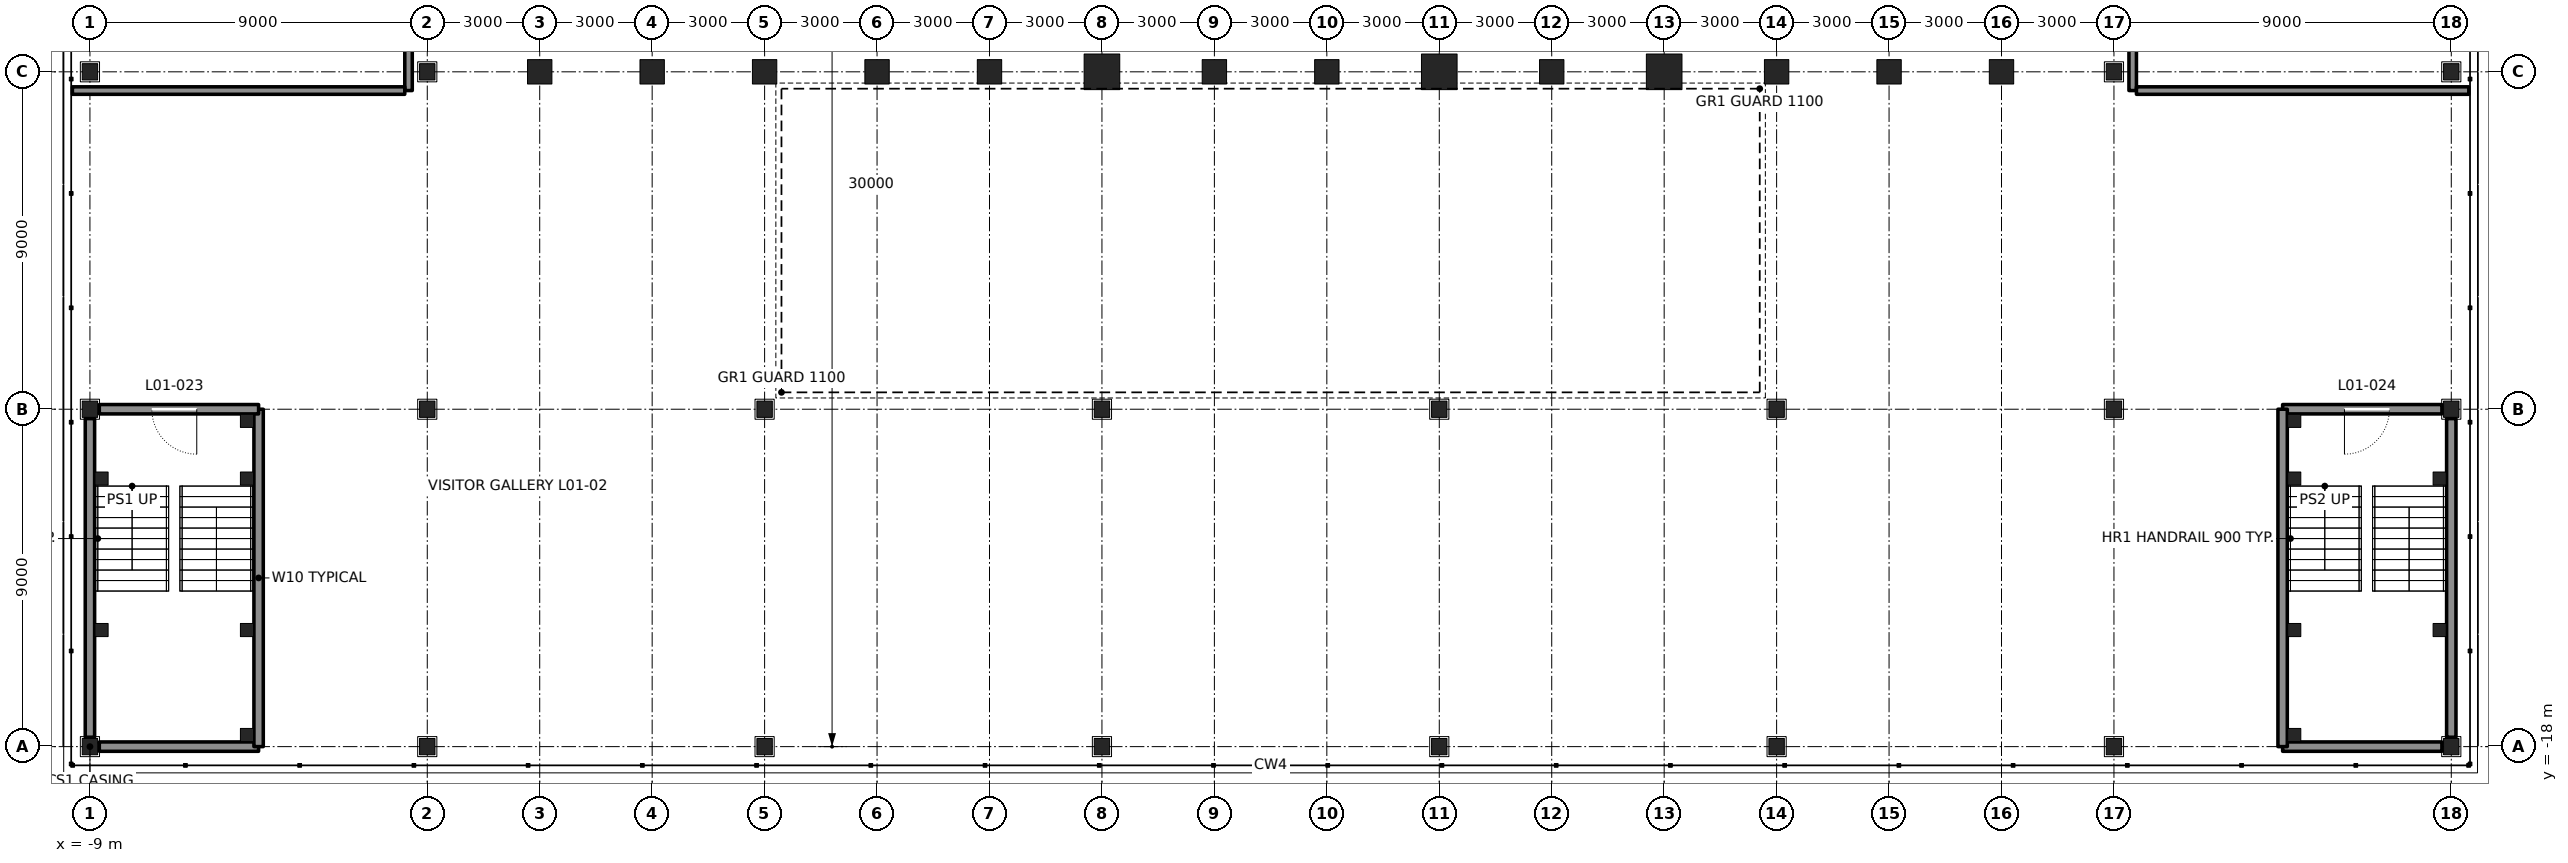
"""IFC4 building model, lengths in metres.
Left out: names, types, materials, properties, quantities, classifications, styles, units other than length and angle.
Written with IfcOpenShell. Run it as: python <this file> out.ifc"""

import sys

from ifc_helpers import new_model, si_unit, direction, frame, frame_2d, origin, origin_2d, place, context, subcontext, project, spatial, rectangle, hollow_rectangle, i_section, extrude, element, fill, save


model = new_model("IFC4")
c1 = context("Model", 3, precision=1e-05, world=origin(), true_north=direction((0.0, 1.0)))
c2 = subcontext(c1, "Body", "Model", "MODEL_VIEW")
j1 = project(units=[si_unit("LENGTHUNIT", "METRE"), si_unit("PLANEANGLEUNIT", "RADIAN")], contexts=[c1])
p1 = place(None, origin())
s1 = spatial("IfcSite", under=j1, at=p1, CompositionType="ELEMENT")
p2 = place(p1, origin())
s2 = spatial("IfcBuilding", under=s1, at=p2, CompositionType="ELEMENT")
p3 = place(p2, frame((0.0, 0.0, 6.0)))
s3 = spatial("IfcBuildingStorey", under=s2, at=p3, CompositionType="ELEMENT", Elevation=6.0)
for number, where, z_axis, x_axis in (
    (1, (3.0, 0.0, 0.0), (0.0, 0.0, 1.0), (0.0, -1.0, 0.0)),
    (2, (6.0, 0.0, 0.0), (0.0, 0.0, 1.0), (0.0, -1.0, 0.0)),
    (3, (9.0, 0.0, 0.0), (0.0, 0.0, 1.0), (0.0, -1.0, 0.0)),
    (4, (12.0, 0.0, 0.0), (0.0, 0.0, 1.0), (0.0, -1.0, 0.0)),
    (5, (15.0, 0.0, 0.0), (0.0, 0.0, 1.0), (0.0, -1.0, 0.0)),
):
    element("IfcColumn", number, at=place(p3, frame(where, z_axis=z_axis, x_axis=x_axis)), inside=s3, PredefinedType="COLUMN", context=c2, shape_type="SweptSolid", body=[
        extrude(hollow_rectangle(XDim=0.65, YDim=0.65, WallThickness=0.065, at=origin_2d()), origin(), (0.0, 0.0, 1.0), 7.5),
    ])
p4 = place(p3, frame((18.0, 0.0, 0.0), z_axis=(0.0, 0.0, 1.0), x_axis=(0.0, -1.0, 0.0)))
e6 = element("IfcColumn", 6, at=p4, inside=s3, PredefinedType="COLUMN", context=c2, shape_type="SweptSolid", body=[
    extrude(hollow_rectangle(XDim=0.95, YDim=0.95, WallThickness=0.11, at=origin_2d()), origin(), (0.0, 0.0, 1.0), 7.5),
])
for number, where, z_axis, x_axis in (
    (7, (21.0, 0.0, 0.0), (0.0, 0.0, 1.0), (0.0, -1.0, 0.0)),
    (8, (24.0, 0.0, 0.0), (0.0, 0.0, 1.0), (0.0, -1.0, 0.0)),
):
    element("IfcColumn", number, at=place(p3, frame(where, z_axis=z_axis, x_axis=x_axis)), inside=s3, PredefinedType="COLUMN", context=c2, shape_type="SweptSolid", body=[
        extrude(hollow_rectangle(XDim=0.65, YDim=0.65, WallThickness=0.065, at=origin_2d()), origin(), (0.0, 0.0, 1.0), 7.5),
    ])
p5 = place(p3, frame((27.0, 0.0, 0.0), z_axis=(0.0, 0.0, 1.0), x_axis=(0.0, -1.0, 0.0)))
e9 = element("IfcColumn", 9, at=p5, inside=s3, PredefinedType="COLUMN", context=c2, shape_type="SweptSolid", body=[
    extrude(hollow_rectangle(XDim=0.95, YDim=0.95, WallThickness=0.11, at=origin_2d()), origin(), (0.0, 0.0, 1.0), 7.5),
])
p6 = place(p3, frame((30.0, 0.0, 0.0), z_axis=(0.0, 0.0, 1.0), x_axis=(0.0, -1.0, 0.0)))
e10 = element("IfcColumn", 10, at=p6, inside=s3, PredefinedType="COLUMN", context=c2, shape_type="SweptSolid", body=[
    extrude(hollow_rectangle(XDim=0.65, YDim=0.65, WallThickness=0.065, at=origin_2d()), origin(), (0.0, 0.0, 1.0), 7.5),
])
p7 = place(p3, frame((33.0, 0.0, 0.0), z_axis=(0.0, 0.0, 1.0), x_axis=(0.0, -1.0, 0.0)))
e11 = element("IfcColumn", 11, at=p7, inside=s3, PredefinedType="COLUMN", context=c2, shape_type="SweptSolid", body=[
    extrude(hollow_rectangle(XDim=0.95, YDim=0.95, WallThickness=0.11, at=origin_2d()), origin(), (0.0, 0.0, 1.0), 7.5),
])
for number, where, z_axis, x_axis in (
    (12, (36.0, 0.0, 0.0), (0.0, 0.0, 1.0), (0.0, -1.0, 0.0)),
    (13, (39.0, 0.0, 0.0), (0.0, 0.0, 1.0), (0.0, -1.0, 0.0)),
    (14, (42.0, 0.0, 0.0), (0.0, 0.0, 1.0), (0.0, -1.0, 0.0)),
):
    element("IfcColumn", number, at=place(p3, frame(where, z_axis=z_axis, x_axis=x_axis)), inside=s3, PredefinedType="COLUMN", context=c2, shape_type="SweptSolid", body=[
        extrude(hollow_rectangle(XDim=0.65, YDim=0.65, WallThickness=0.065, at=origin_2d()), origin(), (0.0, 0.0, 1.0), 7.5),
    ])
for number, where, z_axis, x_axis in (
    (15, (-9.0, -18.0, 0.0), (0.0, 0.0, 1.0), (1.0, 0.0, 0.0)),
    (16, (-9.0, -9.0, 0.0), (0.0, 0.0, 1.0), (1.0, 0.0, 0.0)),
    (17, (-9.0, 0.0, 0.0), (0.0, 0.0, 1.0), (1.0, 0.0, 0.0)),
    (18, (0.0, -18.0, 0.0), (0.0, 0.0, 1.0), (1.0, 0.0, 0.0)),
    (19, (0.0, -9.0, 0.0), (0.0, 0.0, 1.0), (1.0, 0.0, 0.0)),
    (20, (0.0, 0.0, 0.0), (0.0, 0.0, 1.0), (1.0, 0.0, 0.0)),
    (21, (9.0, -18.0, 0.0), (0.0, 0.0, 1.0), (1.0, 0.0, 0.0)),
    (22, (9.0, -9.0, 0.0), (0.0, 0.0, 1.0), (1.0, 0.0, 0.0)),
    (23, (18.0, -18.0, 0.0), (0.0, 0.0, 1.0), (1.0, 0.0, 0.0)),
    (24, (18.0, -9.0, 0.0), (0.0, 0.0, 1.0), (1.0, 0.0, 0.0)),
    (25, (27.0, -18.0, 0.0), (0.0, 0.0, 1.0), (1.0, 0.0, 0.0)),
    (26, (27.0, -9.0, 0.0), (0.0, 0.0, 1.0), (1.0, 0.0, 0.0)),
    (27, (36.0, -18.0, 0.0), (0.0, 0.0, 1.0), (1.0, 0.0, 0.0)),
    (28, (36.0, -9.0, 0.0), (0.0, 0.0, 1.0), (1.0, 0.0, 0.0)),
    (29, (45.0, -18.0, 0.0), (0.0, 0.0, 1.0), (1.0, 0.0, 0.0)),
    (30, (45.0, -9.0, 0.0), (0.0, 0.0, 1.0), (1.0, 0.0, 0.0)),
    (31, (45.0, 0.0, 0.0), (0.0, 0.0, 1.0), (1.0, 0.0, 0.0)),
    (32, (54.0, -18.0, 0.0), (0.0, 0.0, 1.0), (1.0, 0.0, 0.0)),
    (33, (54.0, -9.0, 0.0), (0.0, 0.0, 1.0), (1.0, 0.0, 0.0)),
    (34, (54.0, 0.0, 0.0), (0.0, 0.0, 1.0), (1.0, 0.0, 0.0)),
):
    element("IfcColumn", number, at=place(p3, frame(where, z_axis=z_axis, x_axis=x_axis)), inside=s3, PredefinedType="COLUMN", context=c2, shape_type="SweptSolid", body=[
        extrude(i_section(OverallWidth=0.411, OverallDepth=0.434, WebThickness=0.036, FlangeThickness=0.057, at=origin_2d()), origin(), (0.0, 0.0, 1.0), 7.5),
    ])
p8 = place(p3, frame((-0.5, -0.5, 0.0), z_axis=(0.0, 0.0, 1.0), x_axis=(0.0, 1.0, 0.0)))
e35 = element("IfcWall", 35, at=p8, inside=s3, PredefinedType="PARTITIONING", context=c2, shape_type="SweptSolid", body=[
    extrude(rectangle(XDim=46.018, YDim=0.2, at=frame_2d((23.009, 0.0))), origin(), (0.0, 0.0, 1.0), 7.3),
])
p9 = place(p8, frame((13.1, 0.0, 0.0)))
e36 = element("IfcOpeningElement", 36, at=p9, cuts=e35, PredefinedType="OPENING", context=c2, shape_type="SweptSolid", body=[
    extrude(rectangle(XDim=1.8, YDim=2.4, at=frame_2d((0.9, 1.2))), frame((0.0, 0.11, 0.0), z_axis=(0.0, -1.0, 0.0), x_axis=(1.0, 0.0, 0.0)), (0.0, 0.0, 1.0), 0.22),
])
p10 = place(p3, frame((45.5, -0.5, 0.0), z_axis=(0.0, 0.0, 1.0), x_axis=(0.0, 1.0, 0.0)))
e37 = element("IfcWall", 37, at=p10, inside=s3, PredefinedType="PARTITIONING", context=c2, shape_type="SweptSolid", body=[
    extrude(rectangle(XDim=46.018, YDim=0.2, at=frame_2d((23.009, 0.0))), origin(), (0.0, 0.0, 1.0), 7.3),
])
p11 = place(p10, frame((10.1, 0.0, 0.0)))
e38 = element("IfcOpeningElement", 38, at=p11, cuts=e37, PredefinedType="OPENING", context=c2, shape_type="SweptSolid", body=[
    extrude(rectangle(XDim=1.8, YDim=2.4, at=frame_2d((0.9, 1.2))), frame((0.0, 0.11, 0.0), z_axis=(0.0, -1.0, 0.0), x_axis=(1.0, 0.0, 0.0)), (0.0, 0.0, 1.0), 0.22),
])
for number, where, z_axis, x_axis in (
    (39, (-9.468, -0.5, 0.0), (0.0, 0.0, 1.0), (1.0, 0.0, 0.0)),
    (40, (45.6, -0.5, 0.0), (0.0, 0.0, 1.0), (1.0, 0.0, 0.0)),
):
    element("IfcWall", number, at=place(p3, frame(where, z_axis=z_axis, x_axis=x_axis)), inside=s3, PredefinedType="PARTITIONING", context=c2, shape_type="SweptSolid", body=[
        extrude(rectangle(XDim=8.868, YDim=0.2, at=frame_2d((4.434, 0.0))), origin(), (0.0, 0.0, 1.0), 7.3),
    ])
p12 = place(p3, frame((-8.75, -18.0, 0.0), z_axis=(0.0, 0.0, 1.0), x_axis=(1.0, 0.0, 0.0)))
e41 = element("IfcWall", 41, at=p12, inside=s3, PredefinedType="SOLIDWALL", context=c2, shape_type="SweptSolid", body=[
    extrude(rectangle(XDim=4.25, YDim=0.25, at=frame_2d((2.125, 0.0))), origin(), (0.0, 0.0, 1.0), 6.353),
])
p13 = place(p3, frame((-4.5, -18.0, 0.0), z_axis=(0.0, 0.0, 1.0), x_axis=(0.0, 1.0, 0.0)))
e42 = element("IfcWall", 42, at=p13, inside=s3, PredefinedType="SOLIDWALL", context=c2, shape_type="SweptSolid", body=[
    extrude(rectangle(XDim=9.0, YDim=0.25, at=frame_2d((4.5, 0.0))), origin(), (0.0, 0.0, 1.0), 6.698),
])
p14 = place(p3, frame((-8.75, -9.0, 0.0), z_axis=(0.0, 0.0, 1.0), x_axis=(1.0, 0.0, 0.0)))
e43 = element("IfcWall", 43, at=p14, inside=s3, PredefinedType="SOLIDWALL", context=c2, shape_type="SweptSolid", body=[
    extrude(rectangle(XDim=4.25, YDim=0.25, at=frame_2d((2.125, 0.0))), origin(), (0.0, 0.0, 1.0), 6.353),
])
p15 = place(p14, frame((1.4, 0.0, 0.0)))
e44 = element("IfcOpeningElement", 44, at=p15, cuts=e43, PredefinedType="OPENING", context=c2, shape_type="SweptSolid", body=[
    extrude(rectangle(XDim=1.2, YDim=2.1, at=frame_2d((0.6, 1.05))), frame((0.0, 0.135, 0.0), z_axis=(0.0, -1.0, 0.0), x_axis=(1.0, 0.0, 0.0)), (0.0, 0.0, 1.0), 0.27),
])
p16 = place(p3, frame((-9.0, -17.75, 0.0), z_axis=(0.0, 0.0, 1.0), x_axis=(0.0, 1.0, 0.0)))
e45 = element("IfcWall", 45, at=p16, inside=s3, PredefinedType="SOLIDWALL", context=c2, shape_type="SweptSolid", body=[
    extrude(rectangle(XDim=8.5, YDim=0.25, at=frame_2d((4.25, 0.0))), origin(), (0.0, 0.0, 1.0), 6.353),
])
p17 = place(p3, frame((49.5, -18.0, 0.0), z_axis=(0.0, 0.0, 1.0), x_axis=(1.0, 0.0, 0.0)))
e46 = element("IfcWall", 46, at=p17, inside=s3, PredefinedType="SOLIDWALL", context=c2, shape_type="SweptSolid", body=[
    extrude(rectangle(XDim=4.25, YDim=0.25, at=frame_2d((2.125, 0.0))), origin(), (0.0, 0.0, 1.0), 6.353),
])
p18 = place(p3, frame((54.0, -17.75, 0.0), z_axis=(0.0, 0.0, 1.0), x_axis=(0.0, 1.0, 0.0)))
e47 = element("IfcWall", 47, at=p18, inside=s3, PredefinedType="SOLIDWALL", context=c2, shape_type="SweptSolid", body=[
    extrude(rectangle(XDim=8.5, YDim=0.25, at=frame_2d((4.25, 0.0))), origin(), (0.0, 0.0, 1.0), 6.353),
])
p19 = place(p3, frame((49.5, -9.0, 0.0), z_axis=(0.0, 0.0, 1.0), x_axis=(1.0, 0.0, 0.0)))
e48 = element("IfcWall", 48, at=p19, inside=s3, PredefinedType="SOLIDWALL", context=c2, shape_type="SweptSolid", body=[
    extrude(rectangle(XDim=4.25, YDim=0.25, at=frame_2d((2.125, 0.0))), origin(), (0.0, 0.0, 1.0), 6.353),
])
p20 = place(p19, frame((1.65, 0.0, 0.0)))
e49 = element("IfcOpeningElement", 49, at=p20, cuts=e48, PredefinedType="OPENING", context=c2, shape_type="SweptSolid", body=[
    extrude(rectangle(XDim=1.2, YDim=2.1, at=frame_2d((0.6, 1.05))), frame((0.0, 0.135, 0.0), z_axis=(0.0, -1.0, 0.0), x_axis=(1.0, 0.0, 0.0)), (0.0, 0.0, 1.0), 0.27),
])
p21 = place(p3, frame((49.5, -18.0, 0.0), z_axis=(0.0, 0.0, 1.0), x_axis=(0.0, 1.0, 0.0)))
e50 = element("IfcWall", 50, at=p21, inside=s3, PredefinedType="SOLIDWALL", context=c2, shape_type="SweptSolid", body=[
    extrude(rectangle(XDim=9.0, YDim=0.25, at=frame_2d((4.5, 0.0))), origin(), (0.0, 0.0, 1.0), 6.698),
])
for number, where, z_axis, x_axis in (
    (51, (-4.81, -17.69, 0.0), (0.0, 0.0, 1.0), (1.0, 0.0, 0.0)),
    (52, (-8.69, -14.89, 0.0), (0.0, 0.0, 1.0), (1.0, 0.0, 0.0)),
    (53, (-4.81, -14.89, 0.0), (0.0, 0.0, 1.0), (1.0, 0.0, 0.0)),
    (54, (-8.69, -10.85, 0.0), (0.0, 0.0, 1.0), (1.0, 0.0, 0.0)),
    (55, (-4.81, -10.85, 0.0), (0.0, 0.0, 1.0), (1.0, 0.0, 0.0)),
    (56, (-4.81, -9.31, 0.0), (0.0, 0.0, 1.0), (1.0, 0.0, 0.0)),
    (57, (49.81, -17.69, 0.0), (0.0, 0.0, 1.0), (1.0, 0.0, 0.0)),
    (58, (49.81, -14.89, 0.0), (0.0, 0.0, 1.0), (1.0, 0.0, 0.0)),
    (59, (53.69, -14.89, 0.0), (0.0, 0.0, 1.0), (1.0, 0.0, 0.0)),
    (60, (49.81, -10.85, 0.0), (0.0, 0.0, 1.0), (1.0, 0.0, 0.0)),
    (61, (53.69, -10.85, 0.0), (0.0, 0.0, 1.0), (1.0, 0.0, 0.0)),
    (62, (49.81, -9.31, 0.0), (0.0, 0.0, 1.0), (1.0, 0.0, 0.0)),
):
    element("IfcColumn", number, at=place(p3, frame(where, z_axis=z_axis, x_axis=x_axis)), inside=s3, PredefinedType="COLUMN", context=c2, shape_type="SweptSolid", body=[
        extrude(hollow_rectangle(XDim=0.35, YDim=0.35, WallThickness=0.035, at=origin_2d()), origin(), (0.0, 0.0, 1.0), 7.5),
    ])
p22 = place(p15, frame((1.2, 0.0, 0.0), z_axis=(0.0, 0.0, 1.0), x_axis=(-1.0, 0.0, 0.0)))
e63 = element("IfcDoor", 63, at=p22, inside=s3, OperationType="SINGLE_SWING_LEFT", PredefinedType="DOOR", context=c2, shape_type="SweptSolid", body=[
    extrude(rectangle(XDim=1.2, YDim=2.1, at=frame_2d((0.6, 1.05))), frame((0.0, 0.025, 0.0), z_axis=(0.0, -1.0, 0.0), x_axis=(1.0, 0.0, 0.0)), (0.0, 0.0, 1.0), 0.05),
])
fill(e44, e63)
p23 = place(p20, frame((1.2, 0.0, 0.0), z_axis=(0.0, 0.0, 1.0), x_axis=(-1.0, 0.0, 0.0)))
e64 = element("IfcDoor", 64, at=p23, inside=s3, OperationType="SINGLE_SWING_RIGHT", PredefinedType="DOOR", context=c2, shape_type="SweptSolid", body=[
    extrude(rectangle(XDim=1.2, YDim=2.1, at=frame_2d((0.6, 1.05))), frame((0.0, 0.025, 0.0), z_axis=(0.0, -1.0, 0.0), x_axis=(1.0, 0.0, 0.0)), (0.0, 0.0, 1.0), 0.05),
])
fill(e49, e64)
save(model, sys.argv[1])
